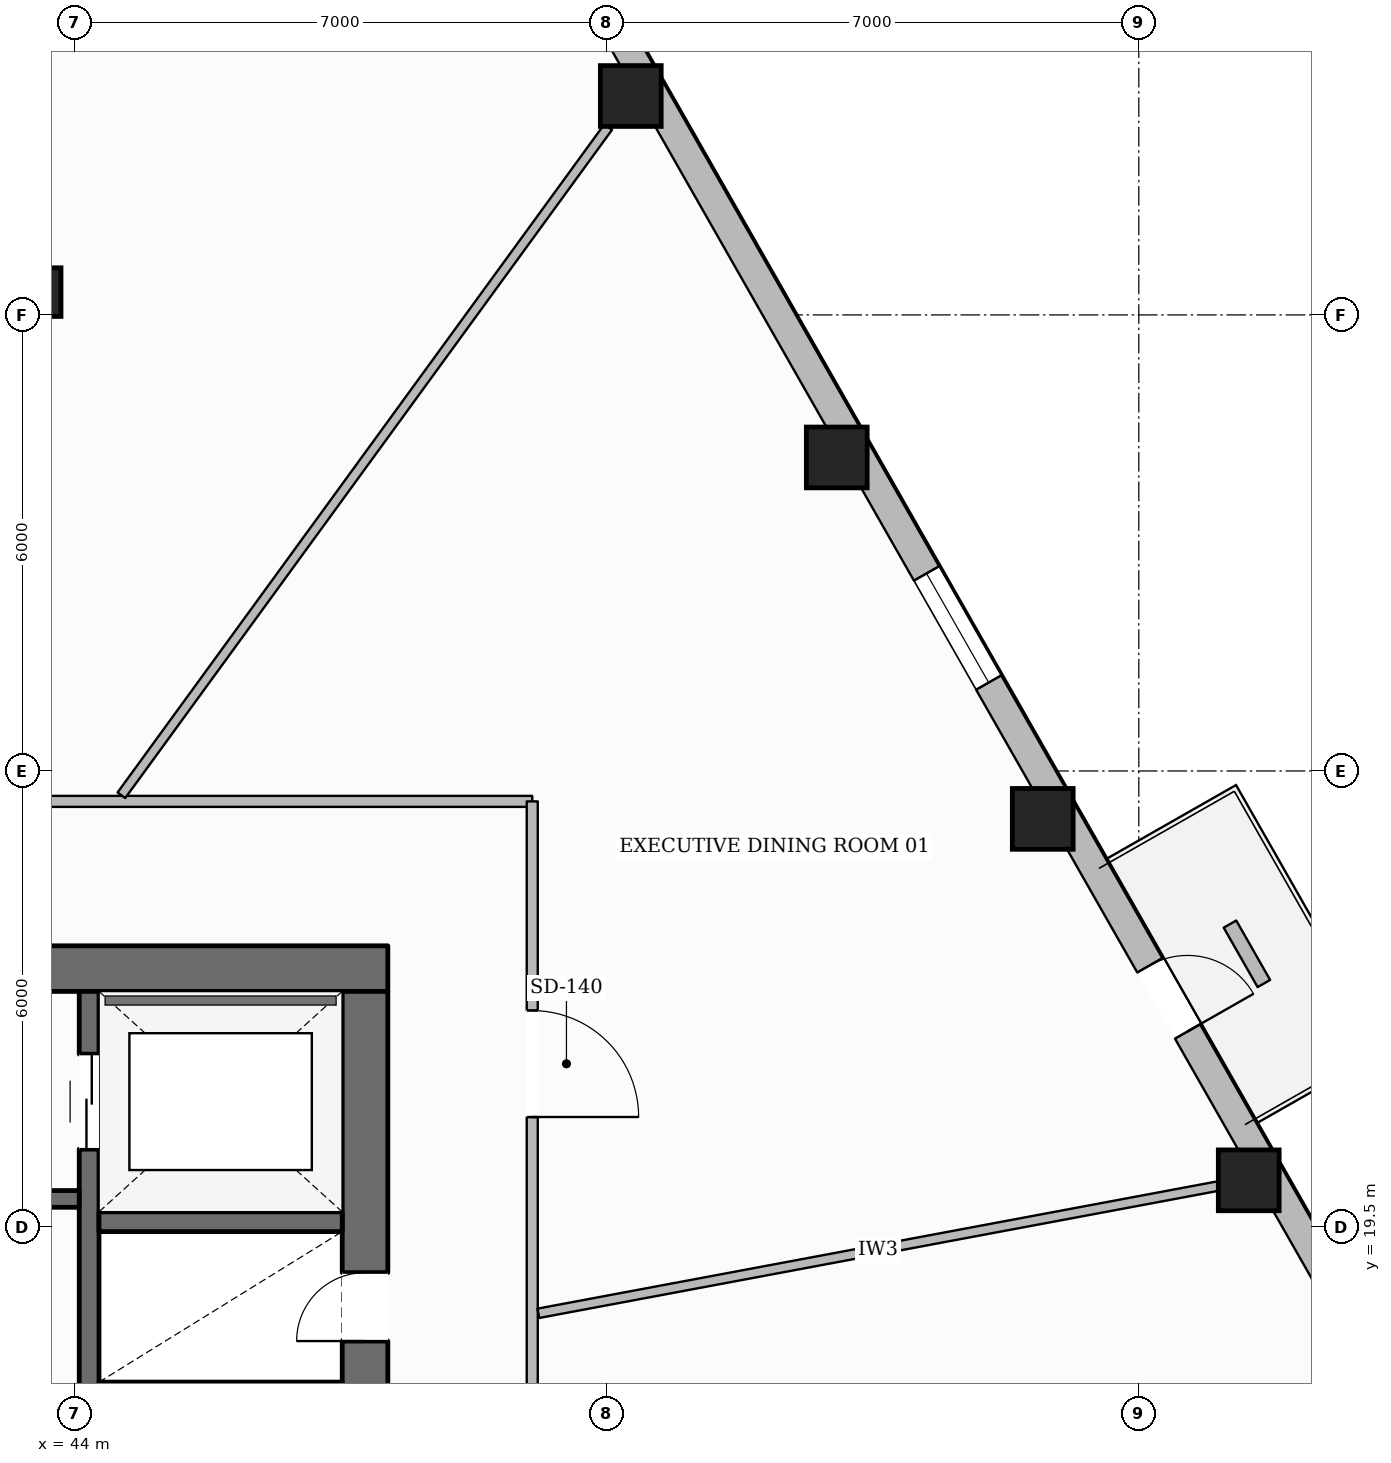
"""IFC4 building model, lengths in metres.
Left out: names, types, materials, properties, quantities, classifications, styles, units other than length and angle.
Written with IfcOpenShell. Run it as: python <this file> out.ifc"""

import sys

from ifc_helpers import new_model, si_unit, direction, frame, frame_2d, origin, origin_2d, place, context, subcontext, project, spatial, rectangle, hollow_rectangle, extrude, element, fill, save


model = new_model("IFC4")
c1 = context("Model", 3, precision=1e-05, world=origin(), true_north=direction((0.0, 1.0)))
c2 = subcontext(c1, "Body", "Model", "MODEL_VIEW")
j1 = project(units=[si_unit("LENGTHUNIT", "METRE"), si_unit("PLANEANGLEUNIT", "RADIAN")], contexts=[c1])
p1 = place(None, origin())
s1 = spatial("IfcSite", under=j1, at=p1, CompositionType="ELEMENT")
p2 = place(p1, origin())
s2 = spatial("IfcBuilding", under=s1, at=p2, CompositionType="ELEMENT")
p3 = place(p2, frame((0.0, 0.0, 17.55)))
s3 = spatial("IfcBuildingStorey", under=s2, at=p3, CompositionType="ELEMENT", Elevation=17.55)
p4 = place(p3, frame((27.88, 22.9, 0.0), z_axis=(0.0, 0.0, 1.0), x_axis=(1.0, 0.0, 0.0)))
e1 = element("IfcWall", 1, at=p4, inside=s3, PredefinedType="SOLIDWALL", context=c2, shape_type="SweptSolid", body=[
    extrude(rectangle(XDim=20.24, YDim=0.6, at=frame_2d((10.12, 0.0))), origin(), (0.0, 0.0, 1.0), 3.59),
])
p5 = place(p4, frame((6.395, 0.0, 0.0)))
e2 = element("IfcOpeningElement", 2, at=p5, cuts=e1, PredefinedType="OPENING", context=c2, shape_type="SweptSolid", body=[
    extrude(rectangle(XDim=1.05, YDim=2.15, at=frame_2d((0.525, 1.075))), frame((0.0, 0.31, 0.0), z_axis=(0.0, -1.0, 0.0), x_axis=(1.0, 0.0, 0.0)), (0.0, 0.0, 1.0), 0.62),
])
p6 = place(p4, frame((12.795, 0.0, 0.0)))
e3 = element("IfcOpeningElement", 3, at=p6, cuts=e1, PredefinedType="OPENING", context=c2, shape_type="SweptSolid", body=[
    extrude(rectangle(XDim=1.05, YDim=2.15, at=frame_2d((0.525, 1.075))), frame((0.0, 0.31, 0.0), z_axis=(0.0, -1.0, 0.0), x_axis=(1.0, 0.0, 0.0)), (0.0, 0.0, 1.0), 0.62),
])
p7 = place(p3, frame((47.82, 9.6, 0.0), z_axis=(0.0, 0.0, 1.0), x_axis=(0.0, 1.0, 0.0)))
e4 = element("IfcWall", 4, at=p7, inside=s3, PredefinedType="SOLIDWALL", context=c2, shape_type="SweptSolid", body=[
    extrude(rectangle(XDim=13.0, YDim=0.6, at=frame_2d((6.5, 0.0))), origin(), (0.0, 0.0, 1.0), 3.59),
])
p8 = place(p7, frame((0.2, 0.0, 0.0)))
e5 = element("IfcOpeningElement", 5, at=p8, cuts=e4, PredefinedType="OPENING", context=c2, shape_type="SweptSolid", body=[
    extrude(rectangle(XDim=1.1, YDim=2.15, at=frame_2d((0.55, 1.075))), frame((0.0, 0.31, 0.0), z_axis=(0.0, -1.0, 0.0), x_axis=(1.0, 0.0, 0.0)), (0.0, 0.0, 1.0), 0.62),
])
p9 = place(p7, frame((8.4, 0.0, 0.0)))
e6 = element("IfcOpeningElement", 6, at=p9, cuts=e4, PredefinedType="OPENING", context=c2, shape_type="SweptSolid", body=[
    extrude(rectangle(XDim=0.9, YDim=2.1, at=frame_2d((0.45, 1.05))), frame((0.0, 0.31, 0.0), z_axis=(0.0, -1.0, 0.0), x_axis=(1.0, 0.0, 0.0)), (0.0, 0.0, 1.0), 0.62),
])
p10 = place(p3, frame((44.19, 9.6, 0.0), z_axis=(0.0, 0.0, 1.0), x_axis=(0.0, 1.0, 0.0)))
e7 = element("IfcWall", 7, at=p10, inside=s3, PredefinedType="SHEAR", context=c2, shape_type="SweptSolid", body=[
    extrude(rectangle(XDim=13.0, YDim=0.26, at=frame_2d((6.5, 0.0))), origin(), (0.0, 0.0, 1.0), 3.59),
])
p11 = place(p10, frame((10.925, 0.0, 0.0)))
e8 = element("IfcOpeningElement", 8, at=p11, cuts=e7, PredefinedType="OPENING", context=c2, shape_type="SweptSolid", body=[
    extrude(rectangle(XDim=1.25, YDim=2.25, at=frame_2d((0.625, 1.125))), frame((0.0, 0.14, 0.0), z_axis=(0.0, -1.0, 0.0), x_axis=(1.0, 0.0, 0.0)), (0.0, 0.0, 1.0), 0.28),
])
for number, where, z_axis, x_axis in (
    (9, (44.32, 17.33, 0.0), (0.0, 0.0, 1.0), (1.0, 0.0, 0.0)),
    (10, (44.32, 19.57, 0.0), (0.0, 0.0, 1.0), (1.0, 0.0, 0.0)),
):
    element("IfcWall", number, at=place(p3, frame(where, z_axis=z_axis, x_axis=x_axis)), inside=s3, PredefinedType="SHEAR", context=c2, shape_type="SweptSolid", body=[
        extrude(rectangle(XDim=3.2, YDim=0.26, at=frame_2d((1.6, 0.0))), origin(), (0.0, 0.0, 1.0), 3.59),
    ])
p12 = place(p3, frame((31.94, 19.87, 0.0), z_axis=(0.0, 0.0, 1.0), x_axis=(1.0, 0.0, 0.0)))
e11 = element("IfcWall", 11, at=p12, inside=s3, PredefinedType="SOLIDWALL", context=c2, shape_type="SweptSolid", body=[
    extrude(rectangle(XDim=12.12, YDim=0.22, at=frame_2d((6.06, 0.0))), origin(), (0.0, 0.0, 1.0), 3.59),
])
p13 = place(p12, frame((6.3, 0.0, 0.0)))
e12 = element("IfcOpeningElement", 12, at=p13, cuts=e11, PredefinedType="OPENING", context=c2, shape_type="SweptSolid", body=[
    extrude(rectangle(XDim=1.1, YDim=2.15, at=frame_2d((0.55, 1.075))), frame((0.0, 0.12, 0.0), z_axis=(0.0, -1.0, 0.0), x_axis=(1.0, 0.0, 0.0)), (0.0, 0.0, 1.0), 0.24),
])
p14 = place(p12, frame((8.23, 0.0, 0.0)))
e13 = element("IfcOpeningElement", 13, at=p14, cuts=e11, PredefinedType="OPENING", context=c2, shape_type="SweptSolid", body=[
    extrude(rectangle(XDim=0.9, YDim=2.1, at=frame_2d((0.45, 1.05))), frame((0.0, 0.12, 0.0), z_axis=(0.0, -1.0, 0.0), x_axis=(1.0, 0.0, 0.0)), (0.0, 0.0, 1.0), 0.24),
])
p15 = place(p12, frame((10.45, 0.0, 0.0)))
e14 = element("IfcOpeningElement", 14, at=p15, cuts=e11, PredefinedType="OPENING", context=c2, shape_type="SweptSolid", body=[
    extrude(rectangle(XDim=0.9, YDim=2.1, at=frame_2d((0.45, 1.05))), frame((0.0, 0.12, 0.0), z_axis=(0.0, -1.0, 0.0), x_axis=(1.0, 0.0, 0.0)), (0.0, 0.0, 1.0), 0.24),
])
for number, where, z_axis, x_axis in (
    (15, (59.446, 20.115, 0.0), (0.0, 0.0, 1.0), (1.0, 0.0, 0.0)),
    (16, (56.736, 24.87, 0.0), (0.0, 0.0, 1.0), (1.0, 0.0, 0.0)),
    (17, (54.026, 29.625, 0.0), (0.0, 0.0, 1.0), (1.0, 0.0, 0.0)),
    (18, (51.316, 34.38, 0.0), (0.0, 0.0, 1.0), (1.0, 0.0, 0.0)),
):
    element("IfcColumn", number, at=place(p3, frame(where, z_axis=z_axis, x_axis=x_axis)), inside=s3, PredefinedType="COLUMN", context=c2, shape_type="SweptSolid", body=[
        extrude(hollow_rectangle(XDim=0.8, YDim=0.8, WallThickness=0.036, at=origin_2d()), origin(), (0.0, 0.0, 1.0), 3.59),
    ])
p16 = place(p3, frame((43.5, 31.8, 0.0), z_axis=(0.0, 0.0, 1.0), x_axis=(1.0, 0.0, 0.0)))
e19 = element("IfcColumn", 19, at=p16, inside=s3, PredefinedType="COLUMN", context=c2, shape_type="SweptSolid", body=[
    extrude(hollow_rectangle(XDim=0.64, YDim=0.64, WallThickness=0.028, at=origin_2d()), origin(), (0.0, 0.0, 1.0), 3.59),
])
p17 = place(p3, frame((45.894, 44.44, 0.0), z_axis=(0.0, 0.0, 1.0), x_axis=(0.495144258579, -0.868810775253, 0.0)))
e20 = element("IfcWall", 20, at=p17, inside=s3, PredefinedType="STANDARD", context=c2, shape_type="SweptSolid", body=[
    extrude(rectangle(XDim=33.792, YDim=0.38, at=frame_2d((16.896, 0.0))), origin(), (0.0, 0.0, 1.0), 2.97),
])
p18 = place(p17, frame((24.744, 0.0, 0.0)))
e21 = element("IfcOpeningElement", 21, at=p18, cuts=e20, PredefinedType="OPENING", context=c2, shape_type="SweptSolid", body=[
    extrude(rectangle(XDim=1.0, YDim=2.2, at=frame_2d((0.5, 1.1))), frame((0.0, 0.2, 0.0), z_axis=(0.0, -1.0, 0.0), x_axis=(1.0, 0.0, 0.0)), (0.0, 0.0, 1.0), 0.4),
])
p19 = place(p17, frame((29.756, 0.0, 0.65)))
e22 = element("IfcOpeningElement", 22, at=p19, cuts=e20, PredefinedType="OPENING", context=c2, shape_type="SweptSolid", body=[
    extrude(rectangle(XDim=1.65, YDim=1.75, at=frame_2d((0.825, 0.875))), frame((0.0, 0.2, 0.0), z_axis=(0.0, -1.0, 0.0), x_axis=(1.0, 0.0, 0.0)), (0.0, 0.0, 1.0), 0.4),
])
p20 = place(p17, frame((18.81, 0.0, 0.65)))
e23 = element("IfcOpeningElement", 23, at=p20, cuts=e20, PredefinedType="OPENING", context=c2, shape_type="SweptSolid", body=[
    extrude(rectangle(XDim=1.65, YDim=1.75, at=frame_2d((0.825, 0.875))), frame((0.0, 0.2, 0.0), z_axis=(0.0, -1.0, 0.0), x_axis=(1.0, 0.0, 0.0)), (0.0, 0.0, 1.0), 0.4),
])
p21 = place(p17, frame((7.864, 0.0, 0.65)))
e24 = element("IfcOpeningElement", 24, at=p21, cuts=e20, PredefinedType="OPENING", context=c2, shape_type="SweptSolid", body=[
    extrude(rectangle(XDim=1.65, YDim=1.75, at=frame_2d((0.825, 0.875))), frame((0.0, 0.2, 0.0), z_axis=(0.0, -1.0, 0.0), x_axis=(1.0, 0.0, 0.0)), (0.0, 0.0, 1.0), 0.4),
])
p22 = place(p17, frame((2.391, 0.0, 0.65)))
e25 = element("IfcOpeningElement", 25, at=p22, cuts=e20, PredefinedType="OPENING", context=c2, shape_type="SweptSolid", body=[
    extrude(rectangle(XDim=1.65, YDim=1.75, at=frame_2d((0.825, 0.875))), frame((0.0, 0.2, 0.0), z_axis=(0.0, -1.0, 0.0), x_axis=(1.0, 0.0, 0.0)), (0.0, 0.0, 1.0), 0.4),
])
p23 = place(p3, frame((59.645, 22.704, 0.0), z_axis=(0.0, 0.0, 1.0), x_axis=(-0.495057669293, 0.868860117668, 0.0)))
e26 = element("IfcWall", 26, at=p23, inside=s3, PredefinedType="USERDEFINED", context=c2, shape_type="SweptSolid", body=[
    extrude(rectangle(XDim=0.9, YDim=0.19, at=frame_2d((0.45, 0.0))), origin(), (0.0, 0.0, 1.0), 0.5),
])
p24 = place(p3, frame((39.0, 25.1, 0.0), z_axis=(0.0, 0.0, 1.0), x_axis=(1.0, 0.0, 0.0)))
e27 = element("IfcWall", 27, at=p24, inside=s3, PredefinedType="PARTITIONING", context=c2, shape_type="SweptSolid", body=[
    extrude(rectangle(XDim=11.02, YDim=0.145, at=frame_2d((5.51, 0.0))), origin(), (0.0, 0.0, 1.0), 3.59),
])
p25 = place(p3, frame((50.02, 25.1, 0.0), z_axis=(0.0, 0.0, 1.0), x_axis=(0.0, -1.0, 0.0)))
e28 = element("IfcWall", 28, at=p25, inside=s3, PredefinedType="PARTITIONING", context=c2, shape_type="SweptSolid", body=[
    extrude(rectangle(XDim=16.0, YDim=0.145, at=frame_2d((8.0, 0.0))), origin(), (0.0, 0.0, 1.0), 3.278),
])
p26 = place(p25, frame((2.752, 0.0, 0.0)))
e29 = element("IfcOpeningElement", 29, at=p26, cuts=e28, PredefinedType="OPENING", context=c2, shape_type="SweptSolid", body=[
    extrude(rectangle(XDim=1.4, YDim=2.2, at=frame_2d((0.7, 1.1))), frame((0.0, 0.083, 0.0), z_axis=(0.0, -1.0, 0.0), x_axis=(1.0, 0.0, 0.0)), (0.0, 0.0, 1.0), 0.165),
])
p27 = place(p25, frame((10.582, 0.0, 0.0)))
e30 = element("IfcOpeningElement", 30, at=p27, cuts=e28, PredefinedType="OPENING", context=c2, shape_type="SweptSolid", body=[
    extrude(rectangle(XDim=1.4, YDim=2.2, at=frame_2d((0.7, 1.1))), frame((0.0, 0.083, 0.0), z_axis=(0.0, -1.0, 0.0), x_axis=(1.0, 0.0, 0.0)), (0.0, 0.0, 1.0), 0.165),
])
p28 = place(p3, frame((50.101, 18.365, 0.0), z_axis=(0.0, 0.0, 1.0), x_axis=(0.982930498742, 0.183977266646, 0.0)))
e31 = element("IfcWall", 31, at=p28, inside=s3, PredefinedType="PARTITIONING", context=c2, shape_type="SweptSolid", body=[
    extrude(rectangle(XDim=9.093, YDim=0.125, at=frame_2d((4.546, 0.0))), origin(), (0.0, 0.0, 1.0), 3.057),
])
p29 = place(p3, frame((44.615, 25.18, 0.0), z_axis=(0.0, 0.0, 1.0), x_axis=(0.588797479065, 0.808280600192, 0.0)))
e32 = element("IfcWall", 32, at=p29, inside=s3, PredefinedType="PARTITIONING", context=c2, shape_type="SweptSolid", body=[
    extrude(rectangle(XDim=10.876, YDim=0.125, at=frame_2d((5.438, 0.0))), origin(), (0.0, 0.0, 1.0), 3.057),
])
p30 = place(p18, origin())
e33 = element("IfcDoor", 33, at=p30, inside=s3, OperationType="SINGLE_SWING_RIGHT", PredefinedType="DOOR", context=c2, shape_type="SweptSolid", body=[
    extrude(rectangle(XDim=1.0, YDim=2.2, at=frame_2d((0.5, 1.1))), frame((0.0, 0.025, 0.0), z_axis=(0.0, -1.0, 0.0), x_axis=(1.0, 0.0, 0.0)), (0.0, 0.0, 1.0), 0.05),
])
fill(e21, e33)
p31 = place(p20, origin())
e34 = element("IfcWindow", 34, at=p31, inside=s3, PartitioningType="SINGLE_PANEL", PredefinedType="WINDOW", context=c2, shape_type="SweptSolid", body=[
    extrude(rectangle(XDim=1.65, YDim=1.75, at=frame_2d((0.825, 0.875))), frame((0.0, 0.03, 0.0), z_axis=(0.0, -1.0, 0.0), x_axis=(1.0, 0.0, 0.0)), (0.0, 0.0, 1.0), 0.06),
])
fill(e23, e34)
p32 = place(p9, origin())
e35 = element("IfcDoor", 35, at=p32, inside=s3, OperationType="SINGLE_SWING_LEFT", PredefinedType="DOOR", context=c2, shape_type="SweptSolid", body=[
    extrude(rectangle(XDim=0.9, YDim=2.1, at=frame_2d((0.45, 1.05))), frame((0.0, 0.025, 0.0), z_axis=(0.0, -1.0, 0.0), x_axis=(1.0, 0.0, 0.0)), (0.0, 0.0, 1.0), 0.05),
])
fill(e6, e35)
p33 = place(p11, origin())
e36 = element("IfcDoor", 36, at=p33, inside=s3, OperationType="DOUBLE_DOOR_SLIDING", PredefinedType="DOOR", context=c2, shape_type="SweptSolid", body=[
    extrude(rectangle(XDim=1.25, YDim=2.25, at=frame_2d((0.625, 1.125))), frame((0.0, 0.025, 0.0), z_axis=(0.0, -1.0, 0.0), x_axis=(1.0, 0.0, 0.0)), (0.0, 0.0, 1.0), 0.05),
])
fill(e8, e36)
p34 = place(p26, origin())
e37 = element("IfcDoor", 37, at=p34, inside=s3, OperationType="SINGLE_SWING_RIGHT", PredefinedType="DOOR", context=c2, shape_type="SweptSolid", body=[
    extrude(rectangle(XDim=1.4, YDim=2.2, at=frame_2d((0.7, 1.1))), frame((0.0, 0.025, 0.0), z_axis=(0.0, -1.0, 0.0), x_axis=(1.0, 0.0, 0.0)), (0.0, 0.0, 1.0), 0.05),
])
fill(e29, e37)
save(model, sys.argv[1])
